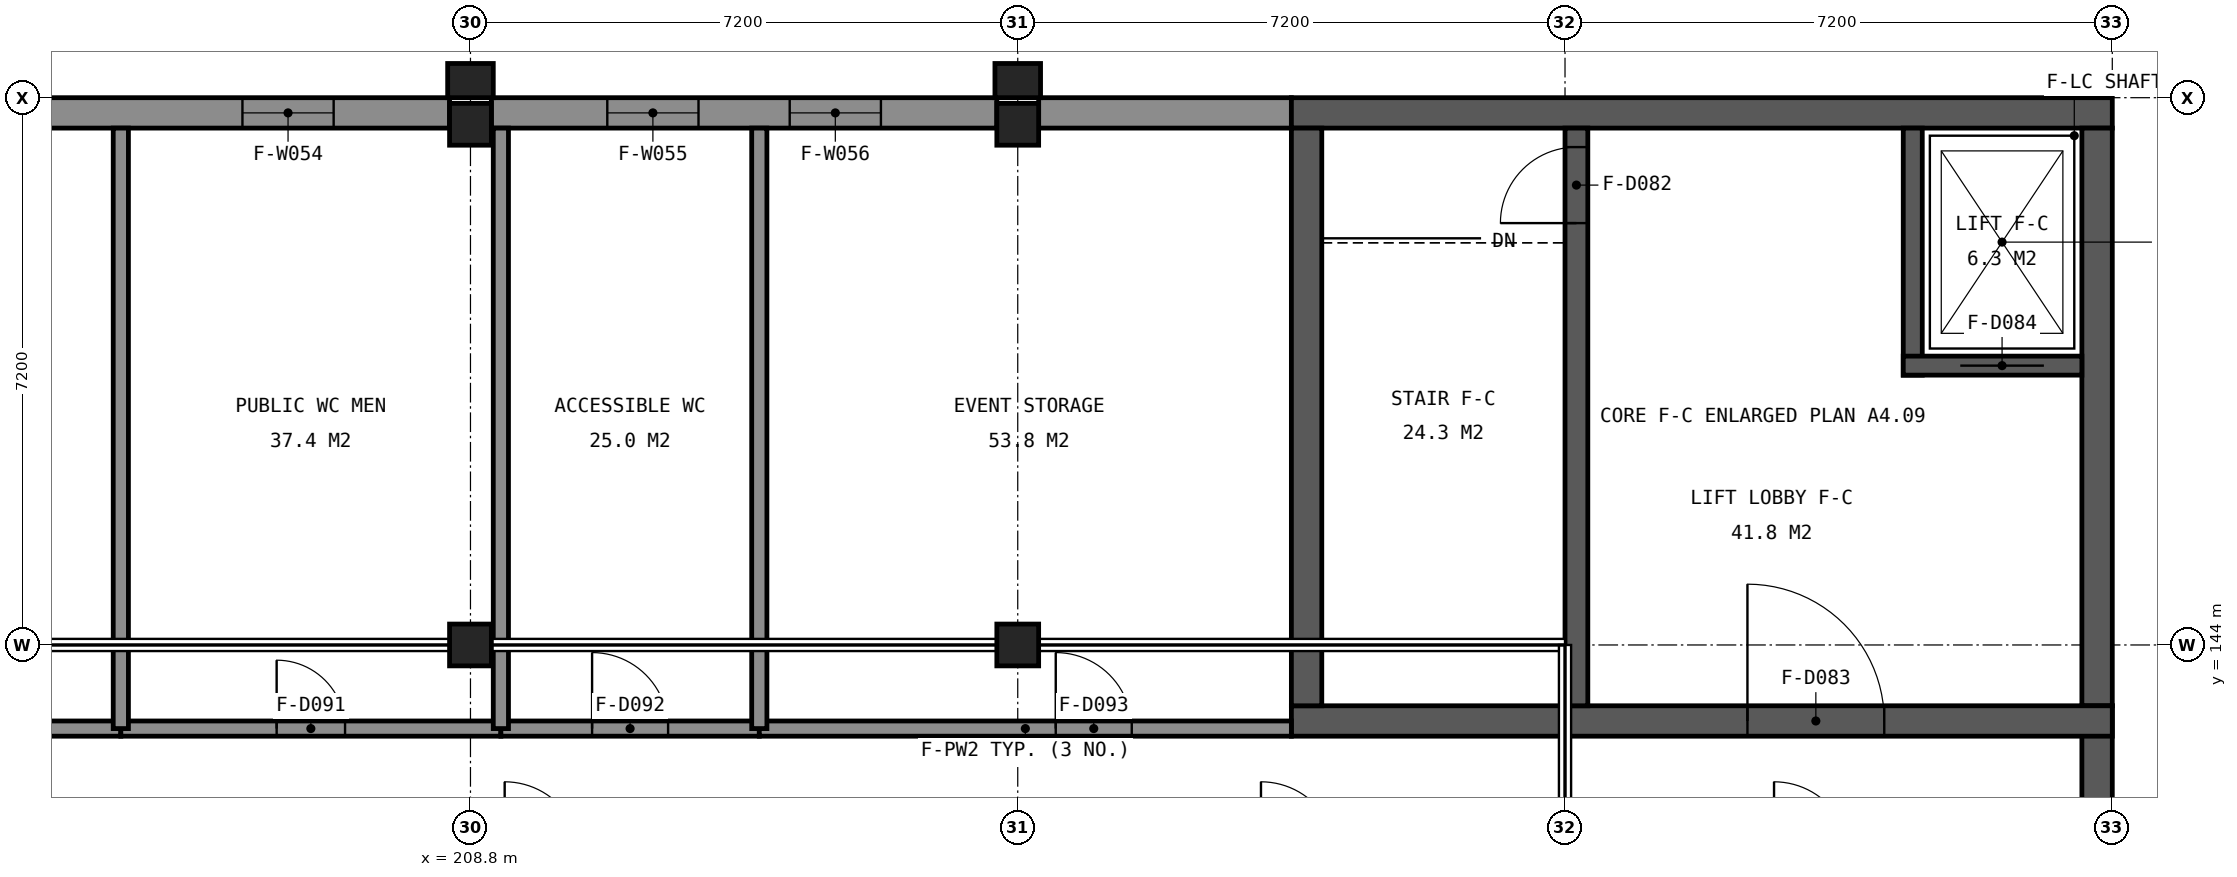
"""IFC4 building model, lengths in metres.
Left out: names, types, materials, properties, quantities, classifications, styles, units other than length and angle.
Written with IfcOpenShell. Run it as: python <this file> out.ifc"""

import sys

from ifc_helpers import new_model, si_unit, direction, frame, frame_2d, origin, origin_2d, place, context, subcontext, project, spatial, rectangle, extrude, element, fill, save


model = new_model("IFC4")
c1 = context("Model", 3, precision=1e-05, world=origin(), true_north=direction((0.0, 1.0)))
c2 = subcontext(c1, "Body", "Model", "MODEL_VIEW")
j1 = project(units=[si_unit("LENGTHUNIT", "METRE"), si_unit("PLANEANGLEUNIT", "RADIAN")], contexts=[c1])
p1 = place(None, origin())
s1 = spatial("IfcSite", under=j1, at=p1, CompositionType="ELEMENT")
p2 = place(p1, origin())
s2 = spatial("IfcBuilding", under=s1, at=p2, CompositionType="ELEMENT")
p3 = place(p2, frame((0.0, 0.0, 14.4)))
s3 = spatial("IfcBuildingStorey", under=s2, at=p3, CompositionType="ELEMENT", Elevation=14.4)
for number, where, z_axis, x_axis in (
    (1, (208.8, 144.0, 0.0), (0.0, 0.0, 1.0), (1.0, 0.0, 0.0)),
    (2, (216.0, 144.0, 0.0), (0.0, 0.0, 1.0), (1.0, 0.0, 0.0)),
    (3, (208.8, 150.85, 0.0), (0.0, 0.0, 1.0), (1.0, 0.0, 0.0)),
    (4, (216.0, 150.85, 0.0), (0.0, 0.0, 1.0), (1.0, 0.0, 0.0)),
):
    element("IfcColumn", number, at=place(p3, frame(where, z_axis=z_axis, x_axis=x_axis)), inside=s3, PredefinedType="COLUMN", context=c2, shape_type="SweptSolid", body=[
        extrude(rectangle(XDim=0.55, YDim=0.55, at=origin_2d()), origin(), (0.0, 0.0, 1.0), 4.8),
    ])
p4 = place(p3, frame((201.875, 151.0, 0.0), z_axis=(0.0, 0.0, 1.0), x_axis=(1.0, 0.0, 0.0)))
e5 = element("IfcWall", 5, at=p4, inside=s3, PredefinedType="SOLIDWALL", context=c2, shape_type="SweptSolid", body=[
    extrude(rectangle(XDim=6.65, YDim=0.4, at=frame_2d((3.325, 0.0))), origin(), (0.0, 0.0, 1.0), 3.95),
])
p5 = place(p4, frame((3.925, 0.0, 1.8)))
e6 = element("IfcOpeningElement", 6, at=p5, cuts=e5, PredefinedType="OPENING", context=c2, shape_type="SweptSolid", body=[
    extrude(rectangle(XDim=1.2, YDim=1.2, at=frame_2d((0.6, 0.6))), frame((0.0, 0.21, 0.0), z_axis=(0.0, -1.0, 0.0), x_axis=(1.0, 0.0, 0.0)), (0.0, 0.0, 1.0), 0.42),
])
p6 = place(p3, frame((209.075, 151.0, 0.0), z_axis=(0.0, 0.0, 1.0), x_axis=(1.0, 0.0, 0.0)))
e7 = element("IfcWall", 7, at=p6, inside=s3, PredefinedType="SOLIDWALL", context=c2, shape_type="SweptSolid", body=[
    extrude(rectangle(XDim=6.65, YDim=0.4, at=frame_2d((3.325, 0.0))), origin(), (0.0, 0.0, 1.0), 3.95),
])
p7 = place(p6, frame((1.525, 0.0, 1.8)))
e8 = element("IfcOpeningElement", 8, at=p7, cuts=e7, PredefinedType="OPENING", context=c2, shape_type="SweptSolid", body=[
    extrude(rectangle(XDim=1.2, YDim=1.2, at=frame_2d((0.6, 0.6))), frame((0.0, 0.21, 0.0), z_axis=(0.0, -1.0, 0.0), x_axis=(1.0, 0.0, 0.0)), (0.0, 0.0, 1.0), 0.42),
])
p8 = place(p6, frame((3.925, 0.0, 1.8)))
e9 = element("IfcOpeningElement", 9, at=p8, cuts=e7, PredefinedType="OPENING", context=c2, shape_type="SweptSolid", body=[
    extrude(rectangle(XDim=1.2, YDim=1.2, at=frame_2d((0.6, 0.6))), frame((0.0, 0.21, 0.0), z_axis=(0.0, -1.0, 0.0), x_axis=(1.0, 0.0, 0.0)), (0.0, 0.0, 1.0), 0.42),
])
p9 = place(p3, frame((216.275, 151.0, 0.0), z_axis=(0.0, 0.0, 1.0), x_axis=(1.0, 0.0, 0.0)))
e10 = element("IfcWall", 10, at=p9, inside=s3, PredefinedType="SOLIDWALL", context=c2, shape_type="SweptSolid", body=[
    extrude(rectangle(XDim=3.325, YDim=0.4, at=frame_2d((1.663, 0.0))), origin(), (0.0, 0.0, 1.0), 3.95),
])
p10 = place(p3, frame((219.6, 151.0, 0.0), z_axis=(0.0, 0.0, 1.0), x_axis=(1.0, 0.0, 0.0)))
e11 = element("IfcWall", 11, at=p10, inside=s3, PredefinedType="SHEAR", context=c2, shape_type="SweptSolid", body=[
    extrude(rectangle(XDim=10.8, YDim=0.4, at=frame_2d((5.4, 0.0))), origin(), (0.0, 0.0, 1.0), 4.55),
])
p11 = place(p3, frame((230.2, 143.2, 0.0), z_axis=(0.0, 0.0, 1.0), x_axis=(0.0, -1.0, 0.0)))
e12 = element("IfcWall", 12, at=p11, inside=s3, PredefinedType="SHEAR", context=c2, shape_type="SweptSolid", body=[
    extrude(rectangle(XDim=6.125, YDim=0.4, at=frame_2d((3.062, 0.0))), origin(), (0.0, 0.0, 1.0), 3.95),
])
p12 = place(p11, frame((3.663, 0.0, 1.8)))
e13 = element("IfcOpeningElement", 13, at=p12, cuts=e12, PredefinedType="OPENING", context=c2, shape_type="SweptSolid", body=[
    extrude(rectangle(XDim=1.2, YDim=1.2, at=frame_2d((0.6, 0.6))), frame((0.0, 0.21, 0.0), z_axis=(0.0, -1.0, 0.0), x_axis=(1.0, 0.0, 0.0)), (0.0, 0.0, 1.0), 0.42),
])
p13 = place(p3, frame((230.2, 150.8, 0.0), z_axis=(0.0, 0.0, 1.0), x_axis=(0.0, -1.0, 0.0)))
e14 = element("IfcWall", 14, at=p13, inside=s3, PredefinedType="SHEAR", context=c2, shape_type="SweptSolid", body=[
    extrude(rectangle(XDim=7.6, YDim=0.4, at=frame_2d((3.8, 0.0))), origin(), (0.0, 0.0, 1.0), 4.55),
])
p14 = place(p3, frame((219.6, 143.0, 0.0), z_axis=(0.0, 0.0, 1.0), x_axis=(1.0, 0.0, 0.0)))
e15 = element("IfcWall", 15, at=p14, inside=s3, PredefinedType="SHEAR", context=c2, shape_type="SweptSolid", body=[
    extrude(rectangle(XDim=10.8, YDim=0.4, at=frame_2d((5.4, 0.0))), origin(), (0.0, 0.0, 1.0), 4.55),
])
p15 = place(p14, frame((6.0, 0.0, 0.0)))
e16 = element("IfcOpeningElement", 16, at=p15, cuts=e15, PredefinedType="OPENING", context=c2, shape_type="SweptSolid", body=[
    extrude(rectangle(XDim=1.8, YDim=2.1, at=frame_2d((0.9, 1.05))), frame((0.0, 0.21, 0.0), z_axis=(0.0, -1.0, 0.0), x_axis=(1.0, 0.0, 0.0)), (0.0, 0.0, 1.0), 0.42),
])
p16 = place(p3, frame((219.8, 143.2, 0.0), z_axis=(0.0, 0.0, 1.0), x_axis=(0.0, 1.0, 0.0)))
e17 = element("IfcWall", 17, at=p16, inside=s3, PredefinedType="SHEAR", context=c2, shape_type="SweptSolid", body=[
    extrude(rectangle(XDim=7.6, YDim=0.4, at=frame_2d((3.8, 0.0))), origin(), (0.0, 0.0, 1.0), 4.55),
])
p17 = place(p3, frame((223.35, 143.2, 0.0), z_axis=(0.0, 0.0, 1.0), x_axis=(0.0, 1.0, 0.0)))
e18 = element("IfcWall", 18, at=p17, inside=s3, PredefinedType="SHEAR", context=c2, shape_type="SweptSolid", body=[
    extrude(rectangle(XDim=7.6, YDim=0.3, at=frame_2d((3.8, 0.0))), origin(), (0.0, 0.0, 1.0), 4.55),
])
p18 = place(p17, frame((6.35, 0.0, 0.0)))
e19 = element("IfcOpeningElement", 19, at=p18, cuts=e18, PredefinedType="OPENING", context=c2, shape_type="SweptSolid", body=[
    extrude(rectangle(XDim=1.0, YDim=2.1, at=frame_2d((0.5, 1.05))), frame((0.0, 0.16, 0.0), z_axis=(0.0, -1.0, 0.0), x_axis=(1.0, 0.0, 0.0)), (0.0, 0.0, 1.0), 0.32),
])
p19 = place(p3, frame((227.775, 147.55, 0.0), z_axis=(0.0, 0.0, 1.0), x_axis=(0.0, 1.0, 0.0)))
e20 = element("IfcWall", 20, at=p19, inside=s3, PredefinedType="SHEAR", context=c2, shape_type="SweptSolid", body=[
    extrude(rectangle(XDim=3.25, YDim=0.25, at=frame_2d((1.625, 0.0))), origin(), (0.0, 0.0, 1.0), 4.55),
])
p20 = place(p3, frame((227.65, 147.675, 0.0), z_axis=(0.0, 0.0, 1.0), x_axis=(1.0, 0.0, 0.0)))
e21 = element("IfcWall", 21, at=p20, inside=s3, PredefinedType="SHEAR", context=c2, shape_type="SweptSolid", body=[
    extrude(rectangle(XDim=2.35, YDim=0.25, at=frame_2d((1.175, 0.0))), origin(), (0.0, 0.0, 1.0), 4.55),
])
p21 = place(p20, frame((0.75, 0.0, 0.0)))
e22 = element("IfcOpeningElement", 22, at=p21, cuts=e21, PredefinedType="OPENING", context=c2, shape_type="SweptSolid", body=[
    extrude(rectangle(XDim=1.1, YDim=2.1, at=frame_2d((0.55, 1.05))), frame((0.0, 0.135, 0.0), z_axis=(0.0, -1.0, 0.0), x_axis=(1.0, 0.0, 0.0)), (0.0, 0.0, 1.0), 0.27),
])
p22 = place(p3, frame((158.4, 151.0, 4.8), z_axis=(0.0, 0.0, 1.0), x_axis=(1.0, 0.0, 0.0)))
e23 = element("IfcWall", 23, at=p22, inside=s3, PredefinedType="SOLIDWALL", context=c2, shape_type="SweptSolid", body=[
    extrude(rectangle(XDim=72.0, YDim=0.4, at=frame_2d((36.0, 0.0))), origin(), (0.0, 0.0, 1.0), 0.45),
])
p23 = place(p3, frame((230.2, 150.8, 4.8), z_axis=(0.0, 0.0, 1.0), x_axis=(0.0, -1.0, 0.0)))
e24 = element("IfcWall", 24, at=p23, inside=s3, PredefinedType="SOLIDWALL", context=c2, shape_type="SweptSolid", body=[
    extrude(rectangle(XDim=20.8, YDim=0.4, at=frame_2d((10.4, 0.0))), origin(), (0.0, 0.0, 1.0), 0.45),
])
for number, where, z_axis, x_axis in (
    (25, (208.8, 144.0, 4.8), (0.0, 0.0, 1.0), (1.0, 0.0, 0.0)),
    (26, (216.0, 144.0, 4.8), (0.0, 0.0, 1.0), (1.0, 0.0, 0.0)),
    (27, (223.2, 144.0, 4.8), (0.0, 0.0, 1.0), (1.0, 0.0, 0.0)),
):
    element("IfcColumn", number, at=place(p3, frame(where, z_axis=z_axis, x_axis=x_axis)), inside=s3, PredefinedType="COLUMN", context=c2, shape_type="SweptSolid", body=[
        extrude(rectangle(XDim=0.3, YDim=0.3, at=origin_2d()), origin(), (0.0, 0.0, 1.0), 1.4),
    ])
for number, where, z_axis, x_axis in (
    (28, (208.8, 151.425, 0.0), (0.0, 0.0, 1.0), (1.0, 0.0, 0.0)),
    (29, (216.0, 151.425, 0.0), (0.0, 0.0, 1.0), (1.0, 0.0, 0.0)),
):
    element("IfcColumn", number, at=place(p3, frame(where, z_axis=z_axis, x_axis=x_axis)), inside=s3, PredefinedType="PILASTER", context=c2, shape_type="SweptSolid", body=[
        extrude(rectangle(XDim=0.6, YDim=0.45, at=origin_2d()), origin(), (0.0, 0.0, 1.0), 4.05),
    ])
p24 = place(p3, frame((157.8, 151.7, 4.5), z_axis=(0.0, 0.0, 1.0), x_axis=(1.0, 0.0, 0.0)))
e30 = element("IfcWall", 30, at=p24, inside=s3, PredefinedType="SOLIDWALL", context=c2, shape_type="SweptSolid", body=[
    extrude(rectangle(XDim=72.6, YDim=0.2, at=frame_2d((36.3, 0.0))), origin(), (0.0, 0.0, 1.0), 0.45),
])
p25 = place(p3, frame((199.2, 142.9, 0.0), z_axis=(0.0, 0.0, 1.0), x_axis=(1.0, 0.0, 0.0)))
e31 = element("IfcWall", 31, at=p25, inside=s3, PredefinedType="PARTITIONING", context=c2, shape_type="SweptSolid", body=[
    extrude(rectangle(XDim=5.0, YDim=0.2, at=frame_2d((2.5, 0.0))), origin(), (0.0, 0.0, 1.0), 3.95),
])
p26 = place(p25, frame((2.95, 0.0, 0.0)))
e32 = element("IfcOpeningElement", 32, at=p26, cuts=e31, PredefinedType="OPENING", context=c2, shape_type="SweptSolid", body=[
    extrude(rectangle(XDim=0.9, YDim=2.1, at=frame_2d((0.45, 1.05))), frame((0.0, 0.11, 0.0), z_axis=(0.0, -1.0, 0.0), x_axis=(1.0, 0.0, 0.0)), (0.0, 0.0, 1.0), 0.22),
])
p27 = place(p3, frame((204.2, 142.9, 0.0), z_axis=(0.0, 0.0, 1.0), x_axis=(1.0, 0.0, 0.0)))
e33 = element("IfcWall", 33, at=p27, inside=s3, PredefinedType="PARTITIONING", context=c2, shape_type="SweptSolid", body=[
    extrude(rectangle(XDim=5.0, YDim=0.2, at=frame_2d((2.5, 0.0))), origin(), (0.0, 0.0, 1.0), 3.95),
])
p28 = place(p27, frame((2.05, 0.0, 0.0)))
e34 = element("IfcOpeningElement", 34, at=p28, cuts=e33, PredefinedType="OPENING", context=c2, shape_type="SweptSolid", body=[
    extrude(rectangle(XDim=0.9, YDim=2.1, at=frame_2d((0.45, 1.05))), frame((0.0, 0.11, 0.0), z_axis=(0.0, -1.0, 0.0), x_axis=(1.0, 0.0, 0.0)), (0.0, 0.0, 1.0), 0.22),
])
p29 = place(p3, frame((209.2, 142.9, 0.0), z_axis=(0.0, 0.0, 1.0), x_axis=(1.0, 0.0, 0.0)))
e35 = element("IfcWall", 35, at=p29, inside=s3, PredefinedType="PARTITIONING", context=c2, shape_type="SweptSolid", body=[
    extrude(rectangle(XDim=3.4, YDim=0.2, at=frame_2d((1.7, 0.0))), origin(), (0.0, 0.0, 1.0), 3.95),
])
p30 = place(p29, frame((1.2, 0.0, 0.0)))
e36 = element("IfcOpeningElement", 36, at=p30, cuts=e35, PredefinedType="OPENING", context=c2, shape_type="SweptSolid", body=[
    extrude(rectangle(XDim=1.0, YDim=2.1, at=frame_2d((0.5, 1.05))), frame((0.0, 0.11, 0.0), z_axis=(0.0, -1.0, 0.0), x_axis=(1.0, 0.0, 0.0)), (0.0, 0.0, 1.0), 0.22),
])
p31 = place(p3, frame((212.6, 142.9, 0.0), z_axis=(0.0, 0.0, 1.0), x_axis=(1.0, 0.0, 0.0)))
e37 = element("IfcWall", 37, at=p31, inside=s3, PredefinedType="PARTITIONING", context=c2, shape_type="SweptSolid", body=[
    extrude(rectangle(XDim=7.0, YDim=0.2, at=frame_2d((3.5, 0.0))), origin(), (0.0, 0.0, 1.0), 3.95),
])
p32 = place(p31, frame((3.9, 0.0, 0.0)))
e38 = element("IfcOpeningElement", 38, at=p32, cuts=e37, PredefinedType="OPENING", context=c2, shape_type="SweptSolid", body=[
    extrude(rectangle(XDim=1.0, YDim=2.1, at=frame_2d((0.5, 1.05))), frame((0.0, 0.11, 0.0), z_axis=(0.0, -1.0, 0.0), x_axis=(1.0, 0.0, 0.0)), (0.0, 0.0, 1.0), 0.22),
])
for number, where, z_axis, x_axis in (
    (39, (204.2, 142.9, 0.0), (0.0, 0.0, 1.0), (0.0, 1.0, 0.0)),
    (40, (209.2, 142.9, 0.0), (0.0, 0.0, 1.0), (0.0, 1.0, 0.0)),
    (41, (212.6, 142.9, 0.0), (0.0, 0.0, 1.0), (0.0, 1.0, 0.0)),
):
    element("IfcWall", number, at=place(p3, frame(where, z_axis=z_axis, x_axis=x_axis)), inside=s3, PredefinedType="PARTITIONING", context=c2, shape_type="SweptSolid", body=[
        extrude(rectangle(XDim=7.9, YDim=0.2, at=frame_2d((3.95, 0.0))), origin(), (0.0, 0.0, 1.0), 3.95),
    ])
p33 = place(p5, origin())
e42 = element("IfcWindow", 42, at=p33, inside=s3, PartitioningType="SINGLE_PANEL", PredefinedType="WINDOW", context=c2, shape_type="SweptSolid", body=[
    extrude(rectangle(XDim=1.2, YDim=1.2, at=frame_2d((0.6, 0.6))), frame((0.0, -0.09, 0.0), z_axis=(0.0, -1.0, 0.0), x_axis=(1.0, 0.0, 0.0)), (0.0, 0.0, 1.0), 0.06),
])
fill(e6, e42)
p34 = place(p7, origin())
e43 = element("IfcWindow", 43, at=p34, inside=s3, PartitioningType="SINGLE_PANEL", PredefinedType="WINDOW", context=c2, shape_type="SweptSolid", body=[
    extrude(rectangle(XDim=1.2, YDim=1.2, at=frame_2d((0.6, 0.6))), frame((0.0, -0.09, 0.0), z_axis=(0.0, -1.0, 0.0), x_axis=(1.0, 0.0, 0.0)), (0.0, 0.0, 1.0), 0.06),
])
fill(e8, e43)
p35 = place(p8, origin())
e44 = element("IfcWindow", 44, at=p35, inside=s3, PartitioningType="SINGLE_PANEL", PredefinedType="WINDOW", context=c2, shape_type="SweptSolid", body=[
    extrude(rectangle(XDim=1.2, YDim=1.2, at=frame_2d((0.6, 0.6))), frame((0.0, -0.09, 0.0), z_axis=(0.0, -1.0, 0.0), x_axis=(1.0, 0.0, 0.0)), (0.0, 0.0, 1.0), 0.06),
])
fill(e9, e44)
p36 = place(p18, origin())
e45 = element("IfcDoor", 45, at=p36, inside=s3, OperationType="NOTDEFINED", PredefinedType="DOOR", context=c2, shape_type="SweptSolid", body=[
    extrude(rectangle(XDim=1.0, YDim=2.1, at=frame_2d((0.5, 1.05))), frame((0.0, 0.025, 0.0), z_axis=(0.0, -1.0, 0.0), x_axis=(1.0, 0.0, 0.0)), (0.0, 0.0, 1.0), 0.05),
])
fill(e19, e45)
p37 = place(p15, origin())
e46 = element("IfcDoor", 46, at=p37, inside=s3, OperationType="NOTDEFINED", PredefinedType="DOOR", context=c2, shape_type="SweptSolid", body=[
    extrude(rectangle(XDim=1.8, YDim=2.1, at=frame_2d((0.9, 1.05))), frame((0.0, 0.025, 0.0), z_axis=(0.0, -1.0, 0.0), x_axis=(1.0, 0.0, 0.0)), (0.0, 0.0, 1.0), 0.05),
])
fill(e16, e46)
p38 = place(p21, origin())
e47 = element("IfcDoor", 47, at=p38, inside=s3, OperationType="SLIDING_TO_LEFT", PredefinedType="DOOR", context=c2, shape_type="SweptSolid", body=[
    extrude(rectangle(XDim=1.1, YDim=2.1, at=frame_2d((0.55, 1.05))), frame((0.0, 0.025, 0.0), z_axis=(0.0, -1.0, 0.0), x_axis=(1.0, 0.0, 0.0)), (0.0, 0.0, 1.0), 0.05),
])
fill(e22, e47)
p39 = place(p28, origin())
e48 = element("IfcDoor", 48, at=p39, inside=s3, OperationType="NOTDEFINED", PredefinedType="DOOR", context=c2, shape_type="SweptSolid", body=[
    extrude(rectangle(XDim=0.9, YDim=2.1, at=frame_2d((0.45, 1.05))), frame((0.0, 0.025, 0.0), z_axis=(0.0, -1.0, 0.0), x_axis=(1.0, 0.0, 0.0)), (0.0, 0.0, 1.0), 0.05),
])
fill(e34, e48)
p40 = place(p30, origin())
e49 = element("IfcDoor", 49, at=p40, inside=s3, OperationType="NOTDEFINED", PredefinedType="DOOR", context=c2, shape_type="SweptSolid", body=[
    extrude(rectangle(XDim=1.0, YDim=2.1, at=frame_2d((0.5, 1.05))), frame((0.0, 0.025, 0.0), z_axis=(0.0, -1.0, 0.0), x_axis=(1.0, 0.0, 0.0)), (0.0, 0.0, 1.0), 0.05),
])
fill(e36, e49)
p41 = place(p32, origin())
e50 = element("IfcDoor", 50, at=p41, inside=s3, OperationType="NOTDEFINED", PredefinedType="DOOR", context=c2, shape_type="SweptSolid", body=[
    extrude(rectangle(XDim=1.0, YDim=2.1, at=frame_2d((0.5, 1.05))), frame((0.0, 0.025, 0.0), z_axis=(0.0, -1.0, 0.0), x_axis=(1.0, 0.0, 0.0)), (0.0, 0.0, 1.0), 0.05),
])
fill(e38, e50)
save(model, sys.argv[1])
